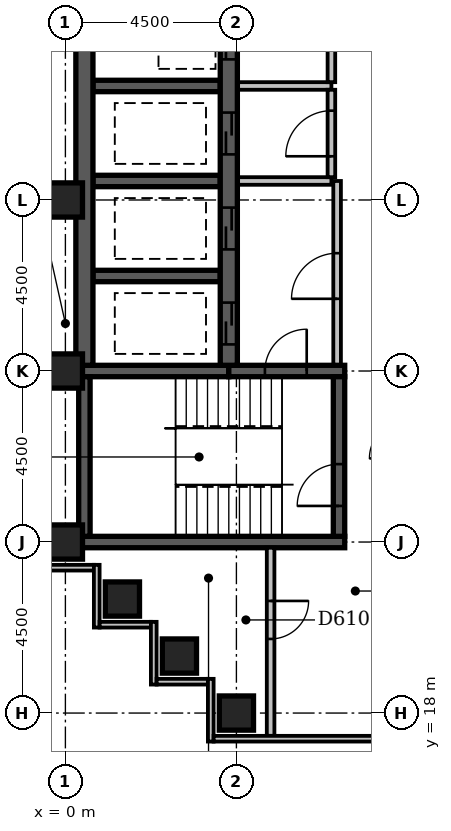
"""IFC4 building model, lengths in metres.
Left out: names, types, materials, properties, quantities, classifications, styles, units other than length and angle.
Written with IfcOpenShell. Run it as: python <this file> out.ifc"""

import sys

from ifc_helpers import new_model, si_unit, direction, frame, frame_2d, origin, origin_2d, place, context, subcontext, project, spatial, rectangle, extrude, element, fill, save


model = new_model("IFC4")
c1 = context("Model", 3, precision=1e-05, world=origin(), true_north=direction((0.0, 1.0)))
c2 = subcontext(c1, "Body", "Model", "MODEL_VIEW")
j1 = project(units=[si_unit("LENGTHUNIT", "METRE"), si_unit("PLANEANGLEUNIT", "RADIAN")], contexts=[c1])
p1 = place(None, origin())
s1 = spatial("IfcSite", under=j1, at=p1, CompositionType="ELEMENT")
p2 = place(p1, origin())
s2 = spatial("IfcBuilding", under=s1, at=p2, CompositionType="ELEMENT")
p3 = place(p2, frame((0.0, 0.0, 236.6)))
s3 = spatial("IfcBuildingStorey", under=s2, at=p3, CompositionType="ELEMENT", Elevation=236.6)
p4 = place(p3, frame((0.35, 22.5, -0.3), z_axis=(0.0, 0.0, 1.0), x_axis=(1.0, 0.0, 0.0)))
e1 = element("IfcWall", 1, at=p4, inside=s3, PredefinedType="SHEAR", context=c2, shape_type="SweptSolid", body=[
    extrude(rectangle(XDim=7.0, YDim=0.3, at=frame_2d((3.5, 0.0))), origin(), (0.0, 0.0, 1.0), 3.6),
])
p5 = place(p3, frame((0.35, 27.0, -0.3), z_axis=(0.0, 0.0, 1.0), x_axis=(1.0, 0.0, 0.0)))
e2 = element("IfcWall", 2, at=p5, inside=s3, PredefinedType="SHEAR", context=c2, shape_type="SweptSolid", body=[
    extrude(rectangle(XDim=3.95, YDim=0.3, at=frame_2d((1.975, 0.0))), origin(), (0.0, 0.0, 1.0), 3.6),
])
p6 = place(p3, frame((0.5, 22.65, -0.3), z_axis=(0.0, 0.0, 1.0), x_axis=(0.0, 1.0, 0.0)))
e3 = element("IfcWall", 3, at=p6, inside=s3, PredefinedType="SHEAR", context=c2, shape_type="SweptSolid", body=[
    extrude(rectangle(XDim=4.2, YDim=0.3, at=frame_2d((2.1, 0.0))), origin(), (0.0, 0.0, 1.0), 3.6),
])
p7 = place(p3, frame((0.5, 27.15, -0.3), z_axis=(0.0, 0.0, 1.0), x_axis=(0.0, 1.0, 0.0)))
e4 = element("IfcWall", 4, at=p7, inside=s3, PredefinedType="SHEAR", context=c2, shape_type="SweptSolid", body=[
    extrude(rectangle(XDim=22.125, YDim=0.45, at=frame_2d((11.062, 0.0))), origin(), (0.0, 0.0, 1.0), 3.6),
])
for number, where, z_axis, x_axis in (
    (5, (0.725, 29.5, -0.3), (0.0, 0.0, 1.0), (1.0, 0.0, 0.0)),
    (6, (0.725, 32.0, -0.3), (0.0, 0.0, 1.0), (1.0, 0.0, 0.0)),
    (7, (0.725, 34.5, -0.3), (0.0, 0.0, 1.0), (1.0, 0.0, 0.0)),
):
    element("IfcWall", number, at=place(p3, frame(where, z_axis=z_axis, x_axis=x_axis)), inside=s3, PredefinedType="SHEAR", context=c2, shape_type="SweptSolid", body=[
        extrude(rectangle(XDim=3.35, YDim=0.3, at=frame_2d((1.675, 0.0))), origin(), (0.0, 0.0, 1.0), 3.6),
    ])
p8 = place(p3, frame((4.3, 27.0, -0.3), z_axis=(0.0, 0.0, 1.0), x_axis=(1.0, 0.0, 0.0)))
e8 = element("IfcWall", 8, at=p8, inside=s3, PredefinedType="SHEAR", context=c2, shape_type="SweptSolid", body=[
    extrude(rectangle(XDim=3.05, YDim=0.3, at=frame_2d((1.525, 0.0))), origin(), (0.0, 0.0, 1.0), 3.6),
])
p9 = place(p8, frame((0.95, 0.0, 0.3)))
e9 = element("IfcOpeningElement", 9, at=p9, cuts=e8, PredefinedType="OPENING", context=c2, shape_type="SweptSolid", body=[
    extrude(rectangle(XDim=1.1, YDim=2.1, at=frame_2d((0.55, 1.05))), frame((0.0, 0.162, 0.0), z_axis=(0.0, -1.0, 0.0), x_axis=(1.0, 0.0, 0.0)), (0.0, 0.0, 1.0), 0.324),
])
p10 = place(p3, frame((4.3, 27.15, -0.3), z_axis=(0.0, 0.0, 1.0), x_axis=(0.0, 1.0, 0.0)))
e10 = element("IfcWall", 10, at=p10, inside=s3, PredefinedType="SHEAR", context=c2, shape_type="SweptSolid", body=[
    extrude(rectangle(XDim=22.125, YDim=0.45, at=frame_2d((11.062, 0.0))), origin(), (0.0, 0.0, 1.0), 3.6),
])
p11 = place(p10, frame((3.05, 0.0, 0.3)))
e11 = element("IfcOpeningElement", 11, at=p11, cuts=e10, PredefinedType="OPENING", context=c2, shape_type="SweptSolid", body=[
    extrude(rectangle(XDim=1.1, YDim=2.1, at=frame_2d((0.55, 1.05))), frame((0.0, 0.237, 0.0), z_axis=(0.0, -1.0, 0.0), x_axis=(1.0, 0.0, 0.0)), (0.0, 0.0, 1.0), 0.474),
])
p12 = place(p10, frame((0.55, 0.0, 0.3)))
e12 = element("IfcOpeningElement", 12, at=p12, cuts=e10, PredefinedType="OPENING", context=c2, shape_type="SweptSolid", body=[
    extrude(rectangle(XDim=1.1, YDim=2.1, at=frame_2d((0.55, 1.05))), frame((0.0, 0.237, 0.0), z_axis=(0.0, -1.0, 0.0), x_axis=(1.0, 0.0, 0.0)), (0.0, 0.0, 1.0), 0.474),
])
p13 = place(p10, frame((20.55, 0.0, 0.3)))
e13 = element("IfcOpeningElement", 13, at=p13, cuts=e10, PredefinedType="OPENING", context=c2, shape_type="SweptSolid", body=[
    extrude(rectangle(XDim=1.1, YDim=2.1, at=frame_2d((0.55, 1.05))), frame((0.0, 0.237, 0.0), z_axis=(0.0, -1.0, 0.0), x_axis=(1.0, 0.0, 0.0)), (0.0, 0.0, 1.0), 0.474),
])
p14 = place(p10, frame((18.05, 0.0, 0.3)))
e14 = element("IfcOpeningElement", 14, at=p14, cuts=e10, PredefinedType="OPENING", context=c2, shape_type="SweptSolid", body=[
    extrude(rectangle(XDim=1.1, YDim=2.1, at=frame_2d((0.55, 1.05))), frame((0.0, 0.237, 0.0), z_axis=(0.0, -1.0, 0.0), x_axis=(1.0, 0.0, 0.0)), (0.0, 0.0, 1.0), 0.474),
])
p15 = place(p10, frame((15.55, 0.0, 0.3)))
e15 = element("IfcOpeningElement", 15, at=p15, cuts=e10, PredefinedType="OPENING", context=c2, shape_type="SweptSolid", body=[
    extrude(rectangle(XDim=1.1, YDim=2.1, at=frame_2d((0.55, 1.05))), frame((0.0, 0.237, 0.0), z_axis=(0.0, -1.0, 0.0), x_axis=(1.0, 0.0, 0.0)), (0.0, 0.0, 1.0), 0.474),
])
p16 = place(p10, frame((13.05, 0.0, 0.3)))
e16 = element("IfcOpeningElement", 16, at=p16, cuts=e10, PredefinedType="OPENING", context=c2, shape_type="SweptSolid", body=[
    extrude(rectangle(XDim=1.1, YDim=2.1, at=frame_2d((0.55, 1.05))), frame((0.0, 0.237, 0.0), z_axis=(0.0, -1.0, 0.0), x_axis=(1.0, 0.0, 0.0)), (0.0, 0.0, 1.0), 0.474),
])
p17 = place(p10, frame((10.55, 0.0, 0.3)))
e17 = element("IfcOpeningElement", 17, at=p17, cuts=e10, PredefinedType="OPENING", context=c2, shape_type="SweptSolid", body=[
    extrude(rectangle(XDim=1.1, YDim=2.1, at=frame_2d((0.55, 1.05))), frame((0.0, 0.237, 0.0), z_axis=(0.0, -1.0, 0.0), x_axis=(1.0, 0.0, 0.0)), (0.0, 0.0, 1.0), 0.474),
])
p18 = place(p10, frame((8.05, 0.0, 0.3)))
e18 = element("IfcOpeningElement", 18, at=p18, cuts=e10, PredefinedType="OPENING", context=c2, shape_type="SweptSolid", body=[
    extrude(rectangle(XDim=1.1, YDim=2.1, at=frame_2d((0.55, 1.05))), frame((0.0, 0.237, 0.0), z_axis=(0.0, -1.0, 0.0), x_axis=(1.0, 0.0, 0.0)), (0.0, 0.0, 1.0), 0.474),
])
p19 = place(p10, frame((5.55, 0.0, 0.3)))
e19 = element("IfcOpeningElement", 19, at=p19, cuts=e10, PredefinedType="OPENING", context=c2, shape_type="SweptSolid", body=[
    extrude(rectangle(XDim=1.1, YDim=2.1, at=frame_2d((0.55, 1.05))), frame((0.0, 0.237, 0.0), z_axis=(0.0, -1.0, 0.0), x_axis=(1.0, 0.0, 0.0)), (0.0, 0.0, 1.0), 0.474),
])
p20 = place(p3, frame((7.2, 22.65, -0.3), z_axis=(0.0, 0.0, 1.0), x_axis=(0.0, 1.0, 0.0)))
e20 = element("IfcWall", 20, at=p20, inside=s3, PredefinedType="SHEAR", context=c2, shape_type="SweptSolid", body=[
    extrude(rectangle(XDim=4.2, YDim=0.3, at=frame_2d((2.1, 0.0))), origin(), (0.0, 0.0, 1.0), 3.6),
])
p21 = place(p20, frame((0.8, 0.0, 0.3)))
e21 = element("IfcOpeningElement", 21, at=p21, cuts=e20, PredefinedType="OPENING", context=c2, shape_type="SweptSolid", body=[
    extrude(rectangle(XDim=1.1, YDim=2.1, at=frame_2d((0.55, 1.05))), frame((0.0, 0.162, 0.0), z_axis=(0.0, -1.0, 0.0), x_axis=(1.0, 0.0, 0.0)), (0.0, 0.0, 1.0), 0.324),
])
for number, where, z_axis, x_axis in (
    (22, (4.5, 18.0, -0.3), (0.0, 0.0, 1.0), (1.0, 0.0, 0.0)),
    (23, (3.0, 19.5, -0.3), (0.0, 0.0, 1.0), (1.0, 0.0, 0.0)),
    (24, (1.5, 21.0, -0.3), (0.0, 0.0, 1.0), (1.0, 0.0, 0.0)),
    (25, (0.0, 22.5, -0.3), (0.0, 0.0, 1.0), (1.0, 0.0, 0.0)),
    (26, (0.0, 27.0, -0.3), (0.0, 0.0, 1.0), (1.0, 0.0, 0.0)),
    (27, (0.0, 31.5, -0.3), (0.0, 0.0, 1.0), (1.0, 0.0, 0.0)),
):
    element("IfcColumn", number, at=place(p3, frame(where, z_axis=z_axis, x_axis=x_axis)), inside=s3, PredefinedType="COLUMN", context=c2, shape_type="SweptSolid", body=[
        extrude(rectangle(XDim=0.9, YDim=0.9, at=origin_2d()), origin(), (0.0, 0.0, 1.0), 3.6),
    ])
p22 = place(p3, frame((-0.6, 21.825, 0.0), z_axis=(0.0, 0.0, 1.0), x_axis=(1.0, 0.0, 0.0)))
e28 = element("IfcWall", 28, at=p22, inside=s3, PredefinedType="STANDARD", context=c2, shape_type="SweptSolid", body=[
    extrude(rectangle(XDim=1.35, YDim=0.15, at=frame_2d((0.675, 0.0))), origin(), (0.0, 0.0, 1.0), 2.7),
])
p23 = place(p3, frame((0.825, 21.9, 0.0), z_axis=(0.0, 0.0, 1.0), x_axis=(0.0, -1.0, 0.0)))
e29 = element("IfcWall", 29, at=p23, inside=s3, PredefinedType="STANDARD", context=c2, shape_type="SweptSolid", body=[
    extrude(rectangle(XDim=1.65, YDim=0.15, at=frame_2d((0.825, 0.0))), origin(), (0.0, 0.0, 1.0), 2.7),
])
p24 = place(p3, frame((0.9, 20.325, 0.0), z_axis=(0.0, 0.0, 1.0), x_axis=(1.0, 0.0, 0.0)))
e30 = element("IfcWall", 30, at=p24, inside=s3, PredefinedType="STANDARD", context=c2, shape_type="SweptSolid", body=[
    extrude(rectangle(XDim=1.35, YDim=0.15, at=frame_2d((0.675, 0.0))), origin(), (0.0, 0.0, 1.0), 2.7),
])
p25 = place(p3, frame((2.325, 20.4, 0.0), z_axis=(0.0, 0.0, 1.0), x_axis=(0.0, -1.0, 0.0)))
e31 = element("IfcWall", 31, at=p25, inside=s3, PredefinedType="STANDARD", context=c2, shape_type="SweptSolid", body=[
    extrude(rectangle(XDim=1.65, YDim=0.15, at=frame_2d((0.825, 0.0))), origin(), (0.0, 0.0, 1.0), 2.7),
])
p26 = place(p3, frame((2.4, 18.825, 0.0), z_axis=(0.0, 0.0, 1.0), x_axis=(1.0, 0.0, 0.0)))
e32 = element("IfcWall", 32, at=p26, inside=s3, PredefinedType="STANDARD", context=c2, shape_type="SweptSolid", body=[
    extrude(rectangle(XDim=1.35, YDim=0.15, at=frame_2d((0.675, 0.0))), origin(), (0.0, 0.0, 1.0), 2.7),
])
p27 = place(p3, frame((3.825, 18.9, 0.0), z_axis=(0.0, 0.0, 1.0), x_axis=(0.0, -1.0, 0.0)))
e33 = element("IfcWall", 33, at=p27, inside=s3, PredefinedType="STANDARD", context=c2, shape_type="SweptSolid", body=[
    extrude(rectangle(XDim=1.65, YDim=0.15, at=frame_2d((0.825, 0.0))), origin(), (0.0, 0.0, 1.0), 2.7),
])
p28 = place(p3, frame((3.9, 17.325, 0.0), z_axis=(0.0, 0.0, 1.0), x_axis=(1.0, 0.0, 0.0)))
e34 = element("IfcWall", 34, at=p28, inside=s3, PredefinedType="STANDARD", context=c2, shape_type="SweptSolid", body=[
    extrude(rectangle(XDim=19.35, YDim=0.15, at=frame_2d((9.675, 0.0))), origin(), (0.0, 0.0, 1.0), 2.7),
])
p29 = place(p28, frame((6.15, 0.0, 0.6)))
e35 = element("IfcOpeningElement", 35, at=p29, cuts=e34, PredefinedType="OPENING", context=c2, shape_type="SweptSolid", body=[
    extrude(rectangle(XDim=2.4, YDim=1.8, at=frame_2d((1.2, 0.9))), frame((0.0, 0.087, 0.0), z_axis=(0.0, -1.0, 0.0), x_axis=(1.0, 0.0, 0.0)), (0.0, 0.0, 1.0), 0.174),
])
p30 = place(p28, frame((15.504, 0.0, 0.6)))
e36 = element("IfcOpeningElement", 36, at=p30, cuts=e34, PredefinedType="OPENING", context=c2, shape_type="SweptSolid", body=[
    extrude(rectangle(XDim=2.4, YDim=1.8, at=frame_2d((1.2, 0.9))), frame((0.0, 0.087, 0.0), z_axis=(0.0, -1.0, 0.0), x_axis=(1.0, 0.0, 0.0)), (0.0, 0.0, 1.0), 0.174),
])
p31 = place(p3, frame((4.545, 34.5, 0.0), z_axis=(0.0, 0.0, 1.0), x_axis=(1.0, 0.0, 0.0)))
e37 = element("IfcWall", 37, at=p31, inside=s3, PredefinedType="PARTITIONING", context=c2, shape_type="SweptSolid", body=[
    extrude(rectangle(XDim=2.455, YDim=0.2, at=frame_2d((1.228, 0.0))), origin(), (0.0, 0.0, 1.0), 3.3),
])
p32 = place(p3, frame((7.0, 34.6, 0.0), z_axis=(0.0, 0.0, 1.0), x_axis=(0.0, 1.0, 0.0)))
e38 = element("IfcWall", 38, at=p32, inside=s3, PredefinedType="PARTITIONING", context=c2, shape_type="SweptSolid", body=[
    extrude(rectangle(XDim=14.9, YDim=0.2, at=frame_2d((7.45, 0.0))), origin(), (0.0, 0.0, 1.0), 3.3),
])
p33 = place(p32, frame((2.8, 0.0, 0.0)))
e39 = element("IfcOpeningElement", 39, at=p33, cuts=e38, PredefinedType="OPENING", context=c2, shape_type="SweptSolid", body=[
    extrude(rectangle(XDim=1.2, YDim=2.1, at=frame_2d((0.6, 1.05))), frame((0.0, 0.112, 0.0), z_axis=(0.0, -1.0, 0.0), x_axis=(1.0, 0.0, 0.0)), (0.0, 0.0, 1.0), 0.224),
])
p34 = place(p32, frame((9.8, 0.0, 0.0)))
e40 = element("IfcOpeningElement", 40, at=p34, cuts=e38, PredefinedType="OPENING", context=c2, shape_type="SweptSolid", body=[
    extrude(rectangle(XDim=1.2, YDim=2.1, at=frame_2d((0.6, 1.05))), frame((0.0, 0.112, 0.0), z_axis=(0.0, -1.0, 0.0), x_axis=(1.0, 0.0, 0.0)), (0.0, 0.0, 1.0), 0.224),
])
p35 = place(p3, frame((4.545, 32.0, 0.0), z_axis=(0.0, 0.0, 1.0), x_axis=(1.0, 0.0, 0.0)))
e41 = element("IfcWall", 41, at=p35, inside=s3, PredefinedType="PARTITIONING", context=c2, shape_type="SweptSolid", body=[
    extrude(rectangle(XDim=2.455, YDim=0.2, at=frame_2d((1.228, 0.0))), origin(), (0.0, 0.0, 1.0), 3.3),
])
p36 = place(p3, frame((7.0, 32.1, 0.0), z_axis=(0.0, 0.0, 1.0), x_axis=(0.0, 1.0, 0.0)))
e42 = element("IfcWall", 42, at=p36, inside=s3, PredefinedType="PARTITIONING", context=c2, shape_type="SweptSolid", body=[
    extrude(rectangle(XDim=2.3, YDim=0.2, at=frame_2d((1.15, 0.0))), origin(), (0.0, 0.0, 1.0), 3.3),
])
p37 = place(p36, frame((0.55, 0.0, 0.0)))
e43 = element("IfcOpeningElement", 43, at=p37, cuts=e42, PredefinedType="OPENING", context=c2, shape_type="SweptSolid", body=[
    extrude(rectangle(XDim=1.2, YDim=2.1, at=frame_2d((0.6, 1.05))), frame((0.0, 0.112, 0.0), z_axis=(0.0, -1.0, 0.0), x_axis=(1.0, 0.0, 0.0)), (0.0, 0.0, 1.0), 0.224),
])
p38 = place(p3, frame((7.15, 27.17, 0.0), z_axis=(0.0, 0.0, 1.0), x_axis=(0.0, 1.0, 0.0)))
e44 = element("IfcWall", 44, at=p38, inside=s3, PredefinedType="PARTITIONING", context=c2, shape_type="SweptSolid", body=[
    extrude(rectangle(XDim=4.83, YDim=0.2, at=frame_2d((2.415, 0.0))), origin(), (0.0, 0.0, 1.0), 3.3),
])
p39 = place(p38, frame((1.73, 0.0, 0.0)))
e45 = element("IfcOpeningElement", 45, at=p39, cuts=e44, PredefinedType="OPENING", context=c2, shape_type="SweptSolid", body=[
    extrude(rectangle(XDim=1.2, YDim=2.1, at=frame_2d((0.6, 1.05))), frame((0.0, 0.112, 0.0), z_axis=(0.0, -1.0, 0.0), x_axis=(1.0, 0.0, 0.0)), (0.0, 0.0, 1.0), 0.224),
])
p40 = place(p3, frame((5.4, 17.4, 0.0), z_axis=(0.0, 0.0, 1.0), x_axis=(0.0, 1.0, 0.0)))
e46 = element("IfcWall", 46, at=p40, inside=s3, PredefinedType="PARTITIONING", context=c2, shape_type="SweptSolid", body=[
    extrude(rectangle(XDim=4.95, YDim=0.2, at=frame_2d((2.475, 0.0))), origin(), (0.0, 0.0, 1.0), 3.3),
])
p41 = place(p40, frame((2.55, 0.0, 0.0)))
e47 = element("IfcOpeningElement", 47, at=p41, cuts=e46, PredefinedType="OPENING", context=c2, shape_type="SweptSolid", body=[
    extrude(rectangle(XDim=1.0, YDim=2.1, at=frame_2d((0.5, 1.05))), frame((0.0, 0.112, 0.0), z_axis=(0.0, -1.0, 0.0), x_axis=(1.0, 0.0, 0.0)), (0.0, 0.0, 1.0), 0.224),
])
p42 = place(p39, origin())
e48 = element("IfcDoor", 48, at=p42, inside=s3, OperationType="SINGLE_SWING_LEFT", PredefinedType="DOOR", context=c2, shape_type="SweptSolid", body=[
    extrude(rectangle(XDim=1.2, YDim=2.1, at=frame_2d((0.6, 1.05))), frame((0.0, 0.025, 0.0), z_axis=(0.0, -1.0, 0.0), x_axis=(1.0, 0.0, 0.0)), (0.0, 0.0, 1.0), 0.05),
])
fill(e45, e48)
p43 = place(p11, origin())
e49 = element("IfcDoor", 49, at=p43, inside=s3, OperationType="SLIDING_TO_LEFT", PredefinedType="DOOR", context=c2, shape_type="SweptSolid", body=[
    extrude(rectangle(XDim=1.1, YDim=2.1, at=frame_2d((0.55, 1.05))), frame((0.0, 0.025, 0.0), z_axis=(0.0, -1.0, 0.0), x_axis=(1.0, 0.0, 0.0)), (0.0, 0.0, 1.0), 0.05),
])
fill(e11, e49)
p44 = place(p12, origin())
e50 = element("IfcDoor", 50, at=p44, inside=s3, OperationType="SLIDING_TO_LEFT", PredefinedType="DOOR", context=c2, shape_type="SweptSolid", body=[
    extrude(rectangle(XDim=1.1, YDim=2.1, at=frame_2d((0.55, 1.05))), frame((0.0, 0.025, 0.0), z_axis=(0.0, -1.0, 0.0), x_axis=(1.0, 0.0, 0.0)), (0.0, 0.0, 1.0), 0.05),
])
fill(e12, e50)
p45 = place(p18, origin())
e51 = element("IfcDoor", 51, at=p45, inside=s3, OperationType="SLIDING_TO_LEFT", PredefinedType="DOOR", context=c2, shape_type="SweptSolid", body=[
    extrude(rectangle(XDim=1.1, YDim=2.1, at=frame_2d((0.55, 1.05))), frame((0.0, 0.025, 0.0), z_axis=(0.0, -1.0, 0.0), x_axis=(1.0, 0.0, 0.0)), (0.0, 0.0, 1.0), 0.05),
])
fill(e18, e51)
p46 = place(p37, origin())
e52 = element("IfcDoor", 52, at=p46, inside=s3, OperationType="SINGLE_SWING_LEFT", PredefinedType="DOOR", context=c2, shape_type="SweptSolid", body=[
    extrude(rectangle(XDim=1.2, YDim=2.1, at=frame_2d((0.6, 1.05))), frame((0.0, 0.025, 0.0), z_axis=(0.0, -1.0, 0.0), x_axis=(1.0, 0.0, 0.0)), (0.0, 0.0, 1.0), 0.05),
])
fill(e43, e52)
p47 = place(p19, origin())
e53 = element("IfcDoor", 53, at=p47, inside=s3, OperationType="SLIDING_TO_LEFT", PredefinedType="DOOR", context=c2, shape_type="SweptSolid", body=[
    extrude(rectangle(XDim=1.1, YDim=2.1, at=frame_2d((0.55, 1.05))), frame((0.0, 0.025, 0.0), z_axis=(0.0, -1.0, 0.0), x_axis=(1.0, 0.0, 0.0)), (0.0, 0.0, 1.0), 0.05),
])
fill(e19, e53)
p48 = place(p9, frame((1.1, 0.0, 0.0), z_axis=(0.0, 0.0, 1.0), x_axis=(-1.0, 0.0, 0.0)))
e54 = element("IfcDoor", 54, at=p48, inside=s3, OperationType="SINGLE_SWING_LEFT", PredefinedType="DOOR", context=c2, shape_type="SweptSolid", body=[
    extrude(rectangle(XDim=1.1, YDim=2.1, at=frame_2d((0.55, 1.05))), frame((0.0, 0.025, 0.0), z_axis=(0.0, -1.0, 0.0), x_axis=(1.0, 0.0, 0.0)), (0.0, 0.0, 1.0), 0.05),
])
fill(e9, e54)
p49 = place(p21, origin())
e55 = element("IfcDoor", 55, at=p49, inside=s3, OperationType="SINGLE_SWING_LEFT", PredefinedType="DOOR", context=c2, shape_type="SweptSolid", body=[
    extrude(rectangle(XDim=1.1, YDim=2.1, at=frame_2d((0.55, 1.05))), frame((0.0, 0.025, 0.0), z_axis=(0.0, -1.0, 0.0), x_axis=(1.0, 0.0, 0.0)), (0.0, 0.0, 1.0), 0.05),
])
fill(e21, e55)
p50 = place(p41, origin())
e56 = element("IfcDoor", 56, at=p50, inside=s3, OperationType="SINGLE_SWING_RIGHT", PredefinedType="DOOR", context=c2, shape_type="SweptSolid", body=[
    extrude(rectangle(XDim=1.0, YDim=2.1, at=frame_2d((0.5, 1.05))), frame((0.0, 0.025, 0.0), z_axis=(0.0, -1.0, 0.0), x_axis=(1.0, 0.0, 0.0)), (0.0, 0.0, 1.0), 0.05),
])
fill(e47, e56)
save(model, sys.argv[1])
